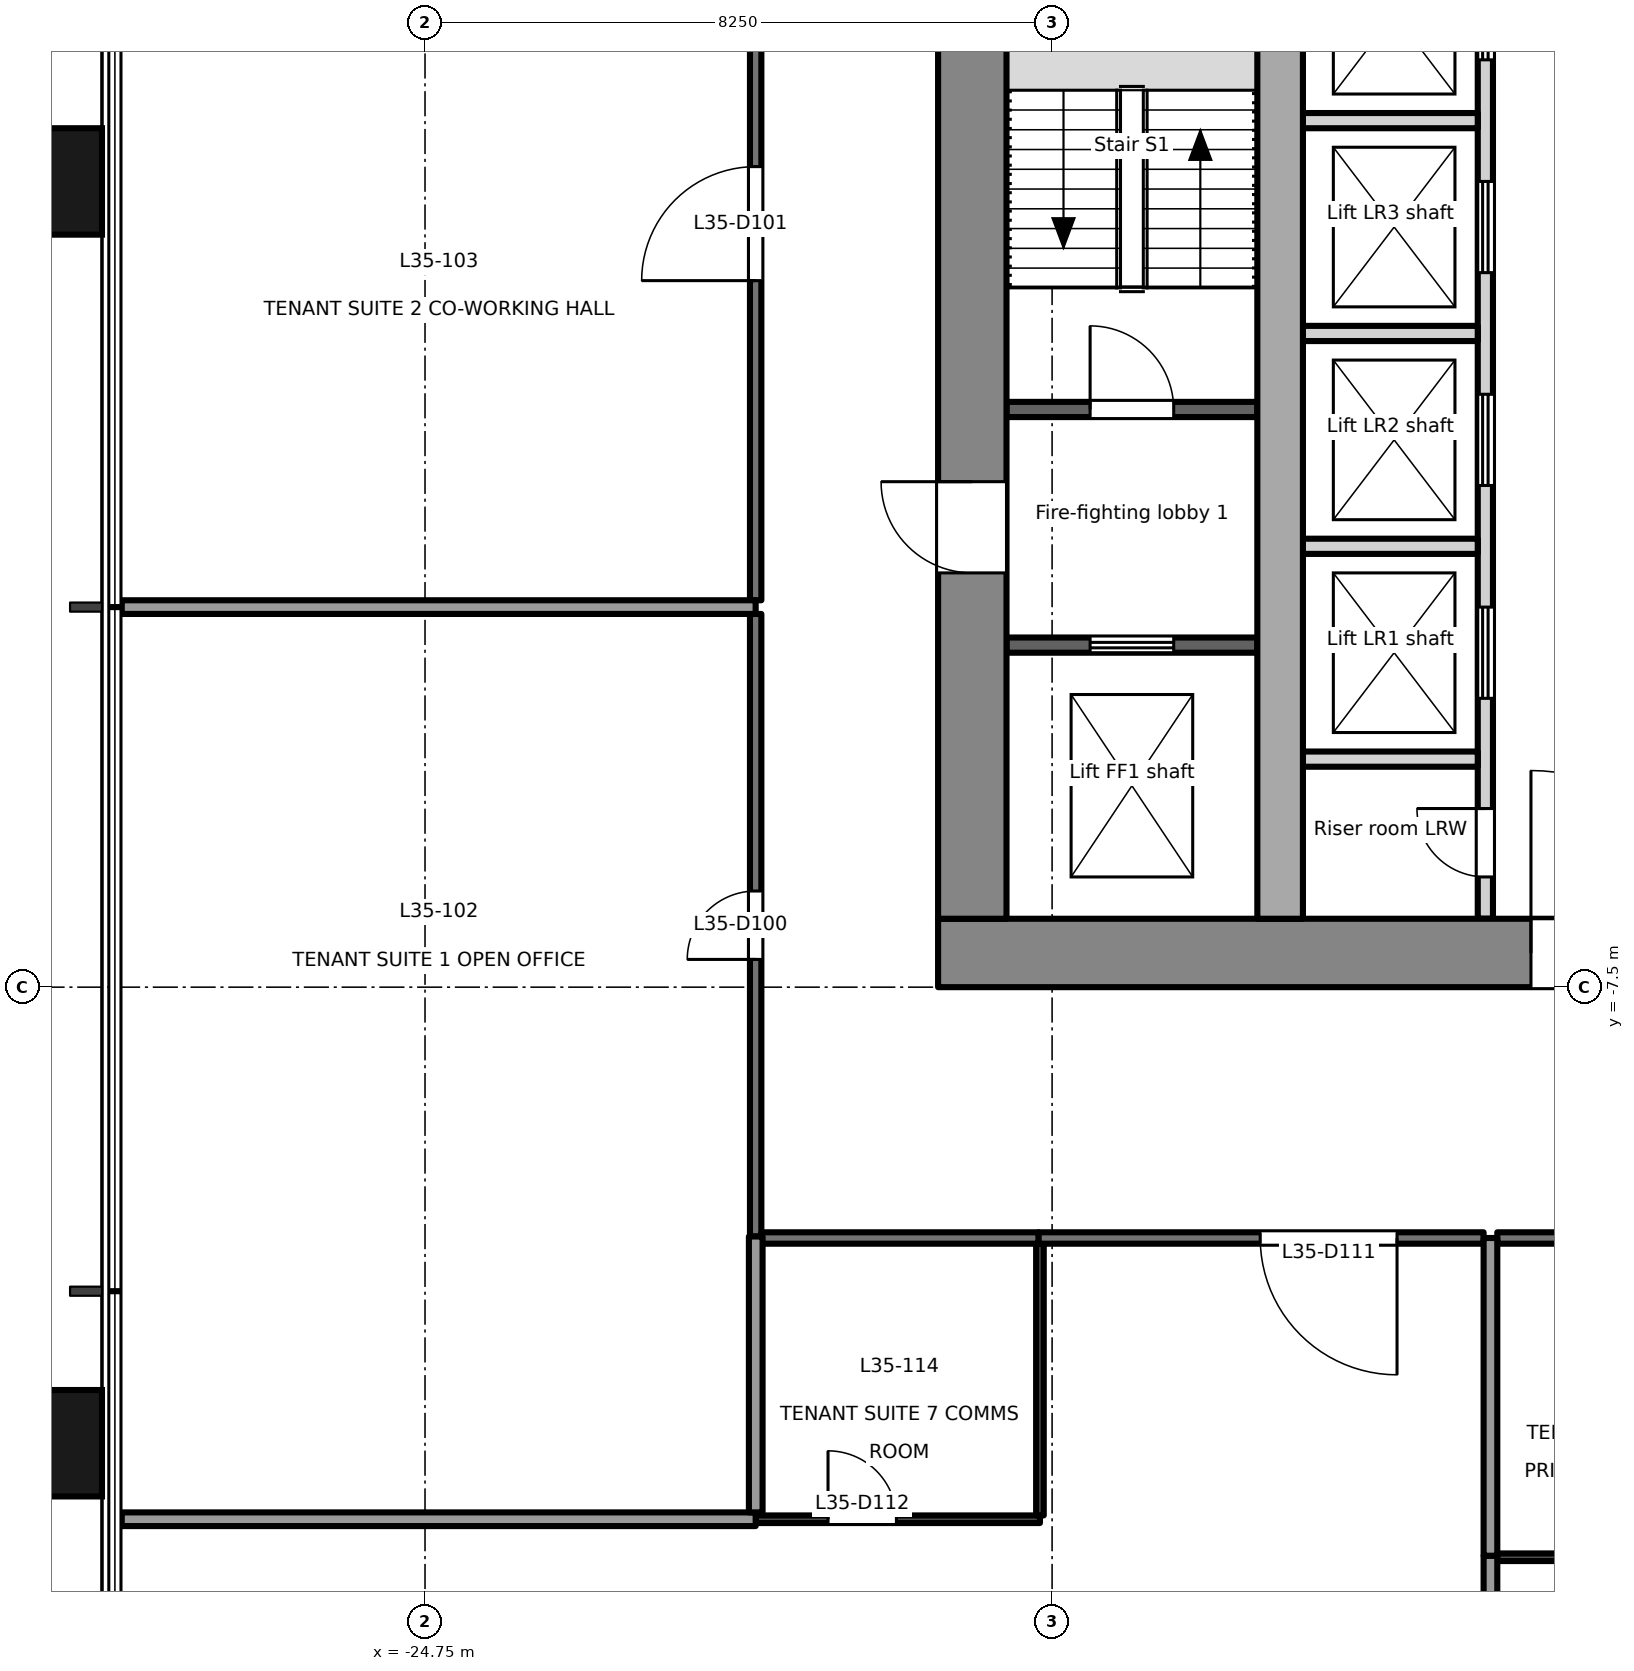
"""IFC4 building model, lengths in metres.
Left out: names, types, materials, properties, quantities, classifications, styles, units other than length and angle.
Written with IfcOpenShell. Run it as: python <this file> out.ifc"""

import sys

from ifc_helpers import new_model, si_unit, direction, frame, frame_2d, origin, origin_2d, place, context, subcontext, project, spatial, rectangle, extrude, element, fill, save


model = new_model("IFC4")
c1 = context("Model", 3, precision=1e-05, world=origin(), true_north=direction((0.0, 1.0)))
c2 = subcontext(c1, "Body", "Model", "MODEL_VIEW")
j1 = project(units=[si_unit("LENGTHUNIT", "METRE"), si_unit("PLANEANGLEUNIT", "RADIAN")], contexts=[c1])
p1 = place(None, origin())
s1 = spatial("IfcSite", under=j1, at=p1, CompositionType="ELEMENT")
p2 = place(p1, origin())
s2 = spatial("IfcBuilding", under=s1, at=p2, CompositionType="ELEMENT")
p3 = place(p2, frame((0.0, 0.0, 154.1)))
s3 = spatial("IfcBuildingStorey", under=s2, at=p3, CompositionType="ELEMENT", Elevation=154.1)
for number, where, z_axis, x_axis in (
    (1, (-29.9, -13.5, -0.2), (0.0, 0.0, 1.0), (0.0, 1.0, 0.0)),
    (2, (-29.9, 3.1, -0.2), (0.0, 0.0, 1.0), (0.0, 1.0, 0.0)),
):
    element("IfcColumn", number, at=place(p3, frame(where, z_axis=z_axis, x_axis=x_axis)), inside=s3, PredefinedType="COLUMN", context=c2, shape_type="SweptSolid", body=[
        extrude(rectangle(XDim=1.4, YDim=1.8, at=origin_2d()), origin(), (0.0, 0.0, 1.0), 4.0),
    ])
p4 = place(p3, frame((-18.0, -7.05, -0.2), z_axis=(0.0, 0.0, 1.0), x_axis=(1.0, 0.0, 0.0)))
e3 = element("IfcWall", 3, at=p4, inside=s3, PredefinedType="SHEAR", context=c2, shape_type="SweptSolid", body=[
    extrude(rectangle(XDim=36.0, YDim=0.9, at=frame_2d((18.0, 0.0))), origin(), (0.0, 0.0, 1.0), 4.0),
])
p5 = place(p4, frame((7.8, 0.0, 0.2)))
e4 = element("IfcOpeningElement", 4, at=p5, cuts=e3, PredefinedType="OPENING", context=c2, shape_type="SweptSolid", body=[
    extrude(rectangle(XDim=2.4, YDim=2.1, at=frame_2d((1.2, 1.05))), frame((0.0, 0.46, 0.0), z_axis=(0.0, -1.0, 0.0), x_axis=(1.0, 0.0, 0.0)), (0.0, 0.0, 1.0), 0.921),
])
p6 = place(p4, frame((17.4, 0.0, 0.2)))
e5 = element("IfcOpeningElement", 5, at=p6, cuts=e3, PredefinedType="OPENING", context=c2, shape_type="SweptSolid", body=[
    extrude(rectangle(XDim=1.2, YDim=2.1, at=frame_2d((0.6, 1.05))), frame((0.0, 0.46, 0.0), z_axis=(0.0, -1.0, 0.0), x_axis=(1.0, 0.0, 0.0)), (0.0, 0.0, 1.0), 0.921),
])
p7 = place(p4, frame((26.1, 0.0, 0.2)))
e6 = element("IfcOpeningElement", 6, at=p7, cuts=e3, PredefinedType="OPENING", context=c2, shape_type="SweptSolid", body=[
    extrude(rectangle(XDim=2.4, YDim=2.1, at=frame_2d((1.2, 1.05))), frame((0.0, 0.46, 0.0), z_axis=(0.0, -1.0, 0.0), x_axis=(1.0, 0.0, 0.0)), (0.0, 0.0, 1.0), 0.921),
])
p8 = place(p3, frame((-17.55, -6.6, -0.2), z_axis=(0.0, 0.0, 1.0), x_axis=(0.0, 1.0, 0.0)))
e7 = element("IfcWall", 7, at=p8, inside=s3, PredefinedType="SHEAR", context=c2, shape_type="SweptSolid", body=[
    extrude(rectangle(XDim=13.2, YDim=0.9, at=frame_2d((6.6, 0.0))), origin(), (0.0, 0.0, 1.0), 4.0),
])
p9 = place(p8, frame((4.55, 0.0, 0.2)))
e8 = element("IfcOpeningElement", 8, at=p9, cuts=e7, PredefinedType="OPENING", context=c2, shape_type="SweptSolid", body=[
    extrude(rectangle(XDim=1.2, YDim=2.1, at=frame_2d((0.6, 1.05))), frame((0.0, 0.46, 0.0), z_axis=(0.0, -1.0, 0.0), x_axis=(1.0, 0.0, 0.0)), (0.0, 0.0, 1.0), 0.921),
])
p10 = place(p3, frame((-13.5, -6.6, -0.2), z_axis=(0.0, 0.0, 1.0), x_axis=(0.0, 1.0, 0.0)))
e9 = element("IfcWall", 9, at=p10, inside=s3, PredefinedType="SHEAR", context=c2, shape_type="SweptSolid", body=[
    extrude(rectangle(XDim=13.2, YDim=0.6, at=frame_2d((6.6, 0.0))), origin(), (0.0, 0.0, 1.0), 4.0),
])
p11 = place(p3, frame((-17.1, -3.0, 0.0), z_axis=(0.0, 0.0, 1.0), x_axis=(1.0, 0.0, 0.0)))
e10 = element("IfcWall", 10, at=p11, inside=s3, PredefinedType="PARTITIONING", context=c2, shape_type="SweptSolid", body=[
    extrude(rectangle(XDim=3.3, YDim=0.2, at=frame_2d((1.65, 0.0))), origin(), (0.0, 0.0, 1.0), 3.8),
])
p12 = place(p11, frame((1.1, 0.0, 0.0)))
e11 = element("IfcOpeningElement", 11, at=p12, cuts=e10, PredefinedType="OPENING", context=c2, shape_type="SweptSolid", body=[
    extrude(rectangle(XDim=1.1, YDim=2.1, at=frame_2d((0.55, 1.05))), frame((0.0, 0.111, 0.0), z_axis=(0.0, -1.0, 0.0), x_axis=(1.0, 0.0, 0.0)), (0.0, 0.0, 1.0), 0.221),
])
p13 = place(p3, frame((-17.1, 0.1, 0.0), z_axis=(0.0, 0.0, 1.0), x_axis=(1.0, 0.0, 0.0)))
e12 = element("IfcWall", 12, at=p13, inside=s3, PredefinedType="PARTITIONING", context=c2, shape_type="SweptSolid", body=[
    extrude(rectangle(XDim=3.3, YDim=0.2, at=frame_2d((1.65, 0.0))), origin(), (0.0, 0.0, 1.0), 3.8),
])
p14 = place(p13, frame((1.1, 0.0, 0.0)))
e13 = element("IfcOpeningElement", 13, at=p14, cuts=e12, PredefinedType="OPENING", context=c2, shape_type="SweptSolid", body=[
    extrude(rectangle(XDim=1.1, YDim=2.1, at=frame_2d((0.55, 1.05))), frame((0.0, 0.111, 0.0), z_axis=(0.0, -1.0, 0.0), x_axis=(1.0, 0.0, 0.0)), (0.0, 0.0, 1.0), 0.221),
])
p15 = place(p3, frame((-10.8, -6.6, 0.0), z_axis=(0.0, 0.0, 1.0), x_axis=(0.0, 1.0, 0.0)))
e14 = element("IfcWall", 14, at=p15, inside=s3, PredefinedType="PARTITIONING", context=c2, shape_type="SweptSolid", body=[
    extrude(rectangle(XDim=13.2, YDim=0.2, at=frame_2d((6.6, 0.0))), origin(), (0.0, 0.0, 1.0), 3.8),
])
p16 = place(p15, frame((0.55, 0.0, 0.0)))
e15 = element("IfcOpeningElement", 15, at=p16, cuts=e14, PredefinedType="OPENING", context=c2, shape_type="SweptSolid", body=[
    extrude(rectangle(XDim=0.9, YDim=2.1, at=frame_2d((0.45, 1.05))), frame((0.0, 0.111, 0.0), z_axis=(0.0, -1.0, 0.0), x_axis=(1.0, 0.0, 0.0)), (0.0, 0.0, 1.0), 0.221),
])
p17 = place(p15, frame((2.9, 0.0, 0.0)))
e16 = element("IfcOpeningElement", 16, at=p17, cuts=e14, PredefinedType="OPENING", context=c2, shape_type="SweptSolid", body=[
    extrude(rectangle(XDim=1.2, YDim=2.1, at=frame_2d((0.6, 1.05))), frame((0.0, 0.111, 0.0), z_axis=(0.0, -1.0, 0.0), x_axis=(1.0, 0.0, 0.0)), (0.0, 0.0, 1.0), 0.221),
])
p18 = place(p15, frame((5.7, 0.0, 0.0)))
e17 = element("IfcOpeningElement", 17, at=p18, cuts=e14, PredefinedType="OPENING", context=c2, shape_type="SweptSolid", body=[
    extrude(rectangle(XDim=1.2, YDim=2.1, at=frame_2d((0.6, 1.05))), frame((0.0, 0.111, 0.0), z_axis=(0.0, -1.0, 0.0), x_axis=(1.0, 0.0, 0.0)), (0.0, 0.0, 1.0), 0.221),
])
p19 = place(p15, frame((8.5, 0.0, 0.0)))
e18 = element("IfcOpeningElement", 18, at=p19, cuts=e14, PredefinedType="OPENING", context=c2, shape_type="SweptSolid", body=[
    extrude(rectangle(XDim=1.2, YDim=2.1, at=frame_2d((0.6, 1.05))), frame((0.0, 0.111, 0.0), z_axis=(0.0, -1.0, 0.0), x_axis=(1.0, 0.0, 0.0)), (0.0, 0.0, 1.0), 0.221),
])
p20 = place(p15, frame((11.3, 0.0, 0.0)))
e19 = element("IfcOpeningElement", 19, at=p20, cuts=e14, PredefinedType="OPENING", context=c2, shape_type="SweptSolid", body=[
    extrude(rectangle(XDim=1.2, YDim=2.1, at=frame_2d((0.6, 1.05))), frame((0.0, 0.111, 0.0), z_axis=(0.0, -1.0, 0.0), x_axis=(1.0, 0.0, 0.0)), (0.0, 0.0, 1.0), 0.221),
])
for number, where, z_axis, x_axis in (
    (20, (-13.2, -1.7, 0.0), (0.0, 0.0, 1.0), (1.0, 0.0, 0.0)),
    (21, (-13.2, 1.1, 0.0), (0.0, 0.0, 1.0), (1.0, 0.0, 0.0)),
    (22, (-13.2, 3.9, 0.0), (0.0, 0.0, 1.0), (1.0, 0.0, 0.0)),
    (23, (-13.2, -4.5, 0.0), (0.0, 0.0, 1.0), (1.0, 0.0, 0.0)),
):
    element("IfcWall", number, at=place(p3, frame(where, z_axis=z_axis, x_axis=x_axis)), inside=s3, PredefinedType="PARTITIONING", context=c2, shape_type="SweptSolid", body=[
        extrude(rectangle(XDim=2.3, YDim=0.2, at=frame_2d((1.15, 0.0))), origin(), (0.0, 0.0, 1.0), 3.8),
    ])
p21 = place(p3, frame((-20.4, -10.78, 0.0), z_axis=(0.0, 0.0, 1.0), x_axis=(0.0, 1.0, 0.0)))
e24 = element("IfcWall", 24, at=p21, inside=s3, PredefinedType="PARTITIONING", context=c2, shape_type="SweptSolid", body=[
    extrude(rectangle(XDim=8.19, YDim=0.15, at=frame_2d((4.095, 0.0))), origin(), (0.0, 0.0, 1.0), 3.3),
])
p22 = place(p21, frame((3.645, 0.0, 0.0)))
e25 = element("IfcOpeningElement", 25, at=p22, cuts=e24, PredefinedType="OPENING", context=c2, shape_type="SweptSolid", body=[
    extrude(rectangle(XDim=0.9, YDim=2.1, at=frame_2d((0.45, 1.05))), frame((0.0, 0.085, 0.0), z_axis=(0.0, -1.0, 0.0), x_axis=(1.0, 0.0, 0.0)), (0.0, 0.0, 1.0), 0.171),
])
p23 = place(p3, frame((-20.4, -2.41, 0.0), z_axis=(0.0, 0.0, 1.0), x_axis=(0.0, 1.0, 0.0)))
e26 = element("IfcWall", 26, at=p23, inside=s3, PredefinedType="PARTITIONING", context=c2, shape_type="SweptSolid", body=[
    extrude(rectangle(XDim=9.91, YDim=0.15, at=frame_2d((4.955, 0.0))), origin(), (0.0, 0.0, 1.0), 3.3),
])
p24 = place(p23, frame((4.205, 0.0, 0.0)))
e27 = element("IfcOpeningElement", 27, at=p24, cuts=e26, PredefinedType="OPENING", context=c2, shape_type="SweptSolid", body=[
    extrude(rectangle(XDim=1.5, YDim=2.1, at=frame_2d((0.75, 1.05))), frame((0.0, 0.085, 0.0), z_axis=(0.0, -1.0, 0.0), x_axis=(1.0, 0.0, 0.0)), (0.0, 0.0, 1.0), 0.171),
])
p25 = place(p3, frame((-10.823, -10.8, 0.0), z_axis=(0.0, 0.0, 1.0), x_axis=(-1.0, 0.0, 0.0)))
e28 = element("IfcWall", 28, at=p25, inside=s3, PredefinedType="PARTITIONING", context=c2, shape_type="SweptSolid", body=[
    extrude(rectangle(XDim=5.857, YDim=0.15, at=frame_2d((2.928, 0.0))), origin(), (0.0, 0.0, 1.0), 2.9),
])
p26 = place(p25, frame((1.139, 0.0, 0.0)))
e29 = element("IfcOpeningElement", 29, at=p26, cuts=e28, PredefinedType="OPENING", context=c2, shape_type="SweptSolid", body=[
    extrude(rectangle(XDim=1.8, YDim=2.1, at=frame_2d((0.9, 1.05))), frame((0.0, 0.085, 0.0), z_axis=(0.0, -1.0, 0.0), x_axis=(1.0, 0.0, 0.0)), (0.0, 0.0, 1.0), 0.171),
])
p27 = place(p3, frame((-16.68, -10.8, 0.0), z_axis=(0.0, 0.0, 1.0), x_axis=(-1.0, 0.0, 0.0)))
e30 = element("IfcWall", 30, at=p27, inside=s3, PredefinedType="PARTITIONING", context=c2, shape_type="SweptSolid", body=[
    extrude(rectangle(XDim=3.645, YDim=0.15, at=frame_2d((1.823, 0.0))), origin(), (0.0, 0.0, 1.0), 3.8),
])
p28 = place(p3, frame((-7.753, -10.8, 0.0), z_axis=(0.0, 0.0, 1.0), x_axis=(-1.0, 0.0, 0.0)))
e31 = element("IfcWall", 31, at=p28, inside=s3, PredefinedType="PARTITIONING", context=c2, shape_type="SweptSolid", body=[
    extrude(rectangle(XDim=2.89, YDim=0.15, at=frame_2d((1.445, 0.0))), origin(), (0.0, 0.0, 1.0), 2.9),
])
for number, where, z_axis, x_axis in (
    (32, (-28.74, -2.5, 0.0), (0.0, 0.0, 1.0), (1.0, 0.0, 0.0)),
    (33, (-20.4, -14.5, 0.0), (0.0, 0.0, 1.0), (-1.0, 0.0, 0.0)),
):
    element("IfcWall", number, at=place(p3, frame(where, z_axis=z_axis, x_axis=x_axis)), inside=s3, PredefinedType="PARTITIONING", context=c2, shape_type="SweptSolid", body=[
        extrude(rectangle(XDim=8.34, YDim=0.18, at=frame_2d((4.17, 0.0))), origin(), (0.0, 0.0, 1.0), 3.8),
    ])
p29 = place(p3, frame((-20.399, -10.78, 0.0), z_axis=(0.0, 0.0, 1.0), x_axis=(0.0, -1.0, 0.0)))
e34 = element("IfcWall", 34, at=p29, inside=s3, PredefinedType="PARTITIONING", context=c2, shape_type="SweptSolid", body=[
    extrude(rectangle(XDim=3.63, YDim=0.18, at=frame_2d((1.815, 0.0))), origin(), (0.0, 0.0, 1.0), 3.8),
])
p30 = place(p3, frame((-20.4, -14.5, 0.0), z_axis=(0.0, 0.0, 1.0), x_axis=(1.0, 0.0, 0.0)))
e35 = element("IfcWall", 35, at=p30, inside=s3, PredefinedType="PARTITIONING", context=c2, shape_type="SweptSolid", body=[
    extrude(rectangle(XDim=3.74, YDim=0.1, at=frame_2d((1.87, 0.0))), origin(), (0.0, 0.0, 1.0), 3.8),
])
p31 = place(p30, frame((0.952, 0.0, 0.0)))
e36 = element("IfcOpeningElement", 36, at=p31, cuts=e35, PredefinedType="OPENING", context=c2, shape_type="SweptSolid", body=[
    extrude(rectangle(XDim=0.9, YDim=2.1, at=frame_2d((0.45, 1.05))), frame((0.0, 0.061, 0.0), z_axis=(0.0, -1.0, 0.0), x_axis=(1.0, 0.0, 0.0)), (0.0, 0.0, 1.0), 0.121),
])
p32 = place(p3, frame((-16.66, -14.45, 0.0), z_axis=(0.0, 0.0, 1.0), x_axis=(0.0, 1.0, 0.0)))
e37 = element("IfcWall", 37, at=p32, inside=s3, PredefinedType="PARTITIONING", context=c2, shape_type="SweptSolid", body=[
    extrude(rectangle(XDim=3.575, YDim=0.1, at=frame_2d((1.788, 0.0))), origin(), (0.0, 0.0, 1.0), 3.8),
])
p33 = place(p3, frame((-10.733, -14.98, 0.0), z_axis=(0.0, 0.0, 1.0), x_axis=(0.0, -1.0, 0.0)))
e38 = element("IfcWall", 38, at=p33, inside=s3, PredefinedType="PARTITIONING", context=c2, shape_type="SweptSolid", body=[
    extrude(rectangle(XDim=14.26, YDim=0.18, at=frame_2d((7.13, 0.0))), origin(), (0.0, 0.0, 1.0), 3.8),
])
p34 = place(p3, frame((-10.733, -10.8, 0.0), z_axis=(0.0, 0.0, 1.0), x_axis=(0.0, -1.0, 0.0)))
e39 = element("IfcWall", 39, at=p34, inside=s3, PredefinedType="PARTITIONING", context=c2, shape_type="SweptSolid", body=[
    extrude(rectangle(XDim=4.18, YDim=0.18, at=frame_2d((2.09, 0.0))), origin(), (0.0, 0.0, 1.0), 3.8),
])
p35 = place(p3, frame((-10.643, -15.0, 0.0), z_axis=(0.0, 0.0, 1.0), x_axis=(1.0, 0.0, 0.0)))
e40 = element("IfcWall", 40, at=p35, inside=s3, PredefinedType="PARTITIONING", context=c2, shape_type="SweptSolid", body=[
    extrude(rectangle(XDim=2.86, YDim=0.1, at=frame_2d((1.43, 0.0))), origin(), (0.0, 0.0, 1.0), 2.9),
])
p36 = place(p12, origin())
e41 = element("IfcDoor", 41, at=p36, inside=s3, OperationType="DOUBLE_DOOR_SLIDING", PredefinedType="DOOR", context=c2, shape_type="SweptSolid", body=[
    extrude(rectangle(XDim=1.1, YDim=2.1, at=frame_2d((0.55, 1.05))), frame((0.0, 0.025, 0.0), z_axis=(0.0, -1.0, 0.0), x_axis=(1.0, 0.0, 0.0)), (0.0, 0.0, 1.0), 0.05),
])
fill(e11, e41)
p37 = place(p9, origin())
e42 = element("IfcDoor", 42, at=p37, inside=s3, OperationType="SINGLE_SWING_RIGHT", PredefinedType="DOOR", context=c2, shape_type="SweptSolid", body=[
    extrude(rectangle(XDim=1.2, YDim=2.1, at=frame_2d((0.6, 1.05))), frame((0.0, 0.025, 0.0), z_axis=(0.0, -1.0, 0.0), x_axis=(1.0, 0.0, 0.0)), (0.0, 0.0, 1.0), 0.05),
])
fill(e8, e42)
p38 = place(p14, origin())
e43 = element("IfcDoor", 43, at=p38, inside=s3, OperationType="SINGLE_SWING_LEFT", PredefinedType="DOOR", context=c2, shape_type="SweptSolid", body=[
    extrude(rectangle(XDim=1.1, YDim=2.1, at=frame_2d((0.55, 1.05))), frame((0.0, 0.025, 0.0), z_axis=(0.0, -1.0, 0.0), x_axis=(1.0, 0.0, 0.0)), (0.0, 0.0, 1.0), 0.05),
])
fill(e13, e43)
p39 = place(p16, origin())
e44 = element("IfcDoor", 44, at=p39, inside=s3, OperationType="SINGLE_SWING_RIGHT", PredefinedType="DOOR", context=c2, shape_type="SweptSolid", body=[
    extrude(rectangle(XDim=0.9, YDim=2.1, at=frame_2d((0.45, 1.05))), frame((0.0, 0.025, 0.0), z_axis=(0.0, -1.0, 0.0), x_axis=(1.0, 0.0, 0.0)), (0.0, 0.0, 1.0), 0.05),
])
fill(e15, e44)
p40 = place(p17, origin())
e45 = element("IfcDoor", 45, at=p40, inside=s3, OperationType="DOUBLE_DOOR_SLIDING", PredefinedType="DOOR", context=c2, shape_type="SweptSolid", body=[
    extrude(rectangle(XDim=1.2, YDim=2.1, at=frame_2d((0.6, 1.05))), frame((0.0, 0.025, 0.0), z_axis=(0.0, -1.0, 0.0), x_axis=(1.0, 0.0, 0.0)), (0.0, 0.0, 1.0), 0.05),
])
fill(e16, e45)
p41 = place(p18, origin())
e46 = element("IfcDoor", 46, at=p41, inside=s3, OperationType="DOUBLE_DOOR_SLIDING", PredefinedType="DOOR", context=c2, shape_type="SweptSolid", body=[
    extrude(rectangle(XDim=1.2, YDim=2.1, at=frame_2d((0.6, 1.05))), frame((0.0, 0.025, 0.0), z_axis=(0.0, -1.0, 0.0), x_axis=(1.0, 0.0, 0.0)), (0.0, 0.0, 1.0), 0.05),
])
fill(e17, e46)
p42 = place(p19, origin())
e47 = element("IfcDoor", 47, at=p42, inside=s3, OperationType="DOUBLE_DOOR_SLIDING", PredefinedType="DOOR", context=c2, shape_type="SweptSolid", body=[
    extrude(rectangle(XDim=1.2, YDim=2.1, at=frame_2d((0.6, 1.05))), frame((0.0, 0.025, 0.0), z_axis=(0.0, -1.0, 0.0), x_axis=(1.0, 0.0, 0.0)), (0.0, 0.0, 1.0), 0.05),
])
fill(e18, e47)
p43 = place(p20, origin())
e48 = element("IfcDoor", 48, at=p43, inside=s3, OperationType="DOUBLE_DOOR_SLIDING", PredefinedType="DOOR", context=c2, shape_type="SweptSolid", body=[
    extrude(rectangle(XDim=1.2, YDim=2.1, at=frame_2d((0.6, 1.05))), frame((0.0, 0.025, 0.0), z_axis=(0.0, -1.0, 0.0), x_axis=(1.0, 0.0, 0.0)), (0.0, 0.0, 1.0), 0.05),
])
fill(e19, e48)
p44 = place(p5, origin())
e49 = element("IfcDoor", 49, at=p44, inside=s3, OperationType="DOUBLE_DOOR_DOUBLE_SWING", PredefinedType="DOOR", context=c2, shape_type="SweptSolid", body=[
    extrude(rectangle(XDim=2.4, YDim=2.1, at=frame_2d((1.2, 1.05))), frame((0.0, 0.025, 0.0), z_axis=(0.0, -1.0, 0.0), x_axis=(1.0, 0.0, 0.0)), (0.0, 0.0, 1.0), 0.05),
])
fill(e4, e49)
p45 = place(p22, origin())
e50 = element("IfcDoor", 50, at=p45, inside=s3, OperationType="SINGLE_SWING_LEFT", PredefinedType="DOOR", context=c2, shape_type="SweptSolid", body=[
    extrude(rectangle(XDim=0.9, YDim=2.1, at=frame_2d((0.45, 1.05))), frame((0.0, 0.025, 0.0), z_axis=(0.0, -1.0, 0.0), x_axis=(1.0, 0.0, 0.0)), (0.0, 0.0, 1.0), 0.05),
])
fill(e25, e50)
p46 = place(p24, origin())
e51 = element("IfcDoor", 51, at=p46, inside=s3, OperationType="DOUBLE_DOOR_SINGLE_SWING", PredefinedType="DOOR", context=c2, shape_type="SweptSolid", body=[
    extrude(rectangle(XDim=1.5, YDim=2.1, at=frame_2d((0.75, 1.05))), frame((0.0, 0.025, 0.0), z_axis=(0.0, -1.0, 0.0), x_axis=(1.0, 0.0, 0.0)), (0.0, 0.0, 1.0), 0.05),
])
fill(e27, e51)
p47 = place(p26, origin())
e52 = element("IfcDoor", 52, at=p47, inside=s3, OperationType="DOUBLE_DOOR_SINGLE_SWING", PredefinedType="DOOR", context=c2, shape_type="SweptSolid", body=[
    extrude(rectangle(XDim=1.8, YDim=2.1, at=frame_2d((0.9, 1.05))), frame((0.0, 0.025, 0.0), z_axis=(0.0, -1.0, 0.0), x_axis=(1.0, 0.0, 0.0)), (0.0, 0.0, 1.0), 0.05),
])
fill(e29, e52)
p48 = place(p31, origin())
e53 = element("IfcDoor", 53, at=p48, inside=s3, OperationType="SINGLE_SWING_LEFT", PredefinedType="DOOR", context=c2, shape_type="SweptSolid", body=[
    extrude(rectangle(XDim=0.9, YDim=2.1, at=frame_2d((0.45, 1.05))), frame((0.0, 0.025, 0.0), z_axis=(0.0, -1.0, 0.0), x_axis=(1.0, 0.0, 0.0)), (0.0, 0.0, 1.0), 0.05),
])
fill(e36, e53)
save(model, sys.argv[1])
